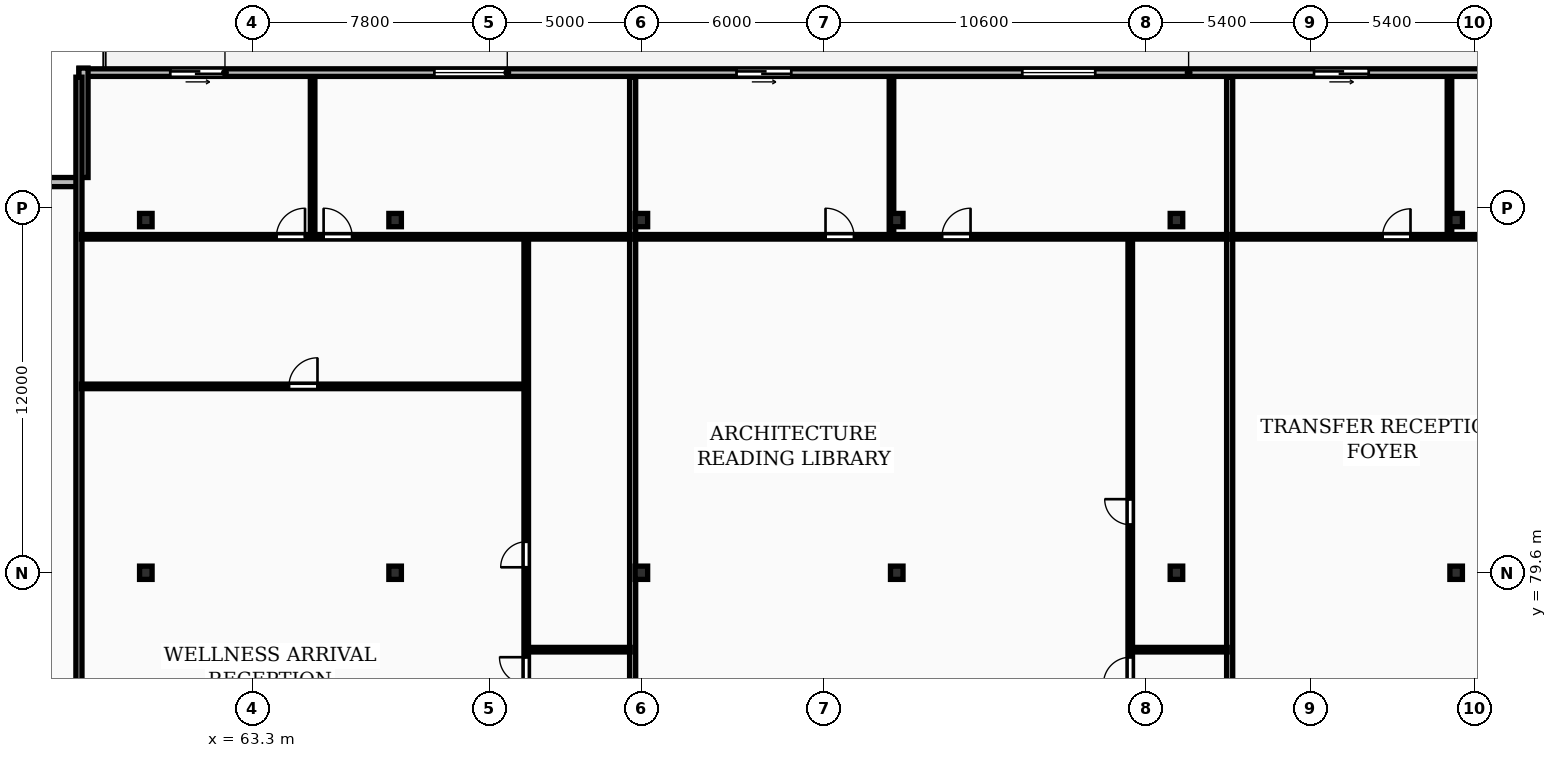
"""IFC4 building model, lengths in metres.
Left out: names, types, materials, properties, quantities, classifications, styles, units other than length and angle.
Written with IfcOpenShell. Run it as: python <this file> out.ifc"""

import sys

from ifc_helpers import new_model, si_unit, direction, frame, frame_2d, origin, origin_2d, place, context, subcontext, project, spatial, rectangle, i_section, extrude, element, fill, save


model = new_model("IFC4")
c1 = context("Model", 3, precision=1e-05, world=origin(), true_north=direction((0.0, 1.0)))
c2 = subcontext(c1, "Body", "Model", "MODEL_VIEW")
j1 = project(units=[si_unit("LENGTHUNIT", "METRE"), si_unit("PLANEANGLEUNIT", "RADIAN")], contexts=[c1])
p1 = place(None, origin())
s1 = spatial("IfcSite", under=j1, at=p1, CompositionType="ELEMENT")
p2 = place(p1, origin())
s2 = spatial("IfcBuilding", under=s1, at=p2, CompositionType="ELEMENT")
p3 = place(p2, frame((0.0, 0.0, 153.7)))
s3 = spatial("IfcBuildingStorey", under=s2, at=p3, CompositionType="ELEMENT", Elevation=153.7)
for number, where, z_axis, x_axis in (
    (1, (59.8, 79.6, 0.0), (0.0, 0.0, 1.0), (1.0, 0.0, 0.0)),
    (2, (59.8, 91.2, 0.0), (0.0, 0.0, 1.0), (1.0, 0.0, 0.0)),
    (3, (68.0, 79.6, 0.0), (0.0, 0.0, 1.0), (1.0, 0.0, 0.0)),
    (4, (68.0, 91.2, 0.0), (0.0, 0.0, 1.0), (1.0, 0.0, 0.0)),
    (5, (76.1, 79.6, 0.0), (0.0, 0.0, 1.0), (1.0, 0.0, 0.0)),
    (6, (76.1, 91.2, 0.0), (0.0, 0.0, 1.0), (1.0, 0.0, 0.0)),
    (7, (84.5, 79.6, 0.0), (0.0, 0.0, 1.0), (1.0, 0.0, 0.0)),
    (8, (84.5, 91.2, 0.0), (0.0, 0.0, 1.0), (1.0, 0.0, 0.0)),
    (9, (93.7, 79.6, 0.0), (0.0, 0.0, 1.0), (1.0, 0.0, 0.0)),
    (10, (93.7, 91.2, 0.0), (0.0, 0.0, 1.0), (1.0, 0.0, 0.0)),
    (11, (102.9, 79.6, 0.0), (0.0, 0.0, 1.0), (1.0, 0.0, 0.0)),
    (12, (102.9, 91.2, 0.0), (0.0, 0.0, 1.0), (1.0, 0.0, 0.0)),
):
    element("IfcColumn", number, at=place(p3, frame(where, z_axis=z_axis, x_axis=x_axis)), inside=s3, PredefinedType="COLUMN", context=c2, shape_type="SweptSolid", body=[
        extrude(i_section(OverallWidth=0.412, OverallDepth=0.437, WebThickness=0.036, FlangeThickness=0.052, FilletRadius=0.015, at=origin_2d()), origin(), (0.0, 0.0, 1.0), 3.6),
    ])
p4 = place(p3, frame((130.6, 96.05, 0.0), z_axis=(0.0, 0.0, 1.0), x_axis=(-1.0, 0.0, 0.0)))
e13 = element("IfcWall", 13, at=p4, inside=s3, PredefinedType="STANDARD", context=c2, shape_type="SweptSolid", body=[
    extrude(rectangle(XDim=73.0, YDim=0.25, at=frame_2d((36.5, 0.0))), origin(), (0.0, 0.0, 1.0), 3.32),
])
p5 = place(p4, frame((68.197, 0.0, 0.0)))
e14 = element("IfcOpeningElement", 14, at=p5, cuts=e13, PredefinedType="OPENING", context=c2, shape_type="SweptSolid", body=[
    extrude(rectangle(XDim=1.8, YDim=2.2, at=frame_2d((0.9, 1.1))), frame((0.0, 0.135, 0.0), z_axis=(0.0, -1.0, 0.0), x_axis=(1.0, 0.0, 0.0)), (0.0, 0.0, 1.0), 0.27),
])
p6 = place(p4, frame((58.911, 0.0, 0.85)))
e15 = element("IfcOpeningElement", 15, at=p6, cuts=e13, PredefinedType="OPENING", context=c2, shape_type="SweptSolid", body=[
    extrude(rectangle(XDim=2.4, YDim=1.9, at=frame_2d((1.2, 0.95))), frame((0.0, 0.135, 0.0), z_axis=(0.0, -1.0, 0.0), x_axis=(1.0, 0.0, 0.0)), (0.0, 0.0, 1.0), 0.27),
])
p7 = place(p4, frame((49.571, 0.0, 0.0)))
e16 = element("IfcOpeningElement", 16, at=p7, cuts=e13, PredefinedType="OPENING", context=c2, shape_type="SweptSolid", body=[
    extrude(rectangle(XDim=1.8, YDim=2.2, at=frame_2d((0.9, 1.1))), frame((0.0, 0.135, 0.0), z_axis=(0.0, -1.0, 0.0), x_axis=(1.0, 0.0, 0.0)), (0.0, 0.0, 1.0), 0.27),
])
p8 = place(p4, frame((39.572, 0.0, 0.85)))
e17 = element("IfcOpeningElement", 17, at=p8, cuts=e13, PredefinedType="OPENING", context=c2, shape_type="SweptSolid", body=[
    extrude(rectangle(XDim=2.4, YDim=1.9, at=frame_2d((1.2, 0.95))), frame((0.0, 0.135, 0.0), z_axis=(0.0, -1.0, 0.0), x_axis=(1.0, 0.0, 0.0)), (0.0, 0.0, 1.0), 0.27),
])
p9 = place(p4, frame((30.575, 0.0, 0.0)))
e18 = element("IfcOpeningElement", 18, at=p9, cuts=e13, PredefinedType="OPENING", context=c2, shape_type="SweptSolid", body=[
    extrude(rectangle(XDim=1.8, YDim=2.2, at=frame_2d((0.9, 1.1))), frame((0.0, 0.135, 0.0), z_axis=(0.0, -1.0, 0.0), x_axis=(1.0, 0.0, 0.0)), (0.0, 0.0, 1.0), 0.27),
])
p10 = place(p4, frame((21.745, 0.0, 0.85)))
e19 = element("IfcOpeningElement", 19, at=p10, cuts=e13, PredefinedType="OPENING", context=c2, shape_type="SweptSolid", body=[
    extrude(rectangle(XDim=2.4, YDim=1.9, at=frame_2d((1.2, 0.95))), frame((0.0, 0.135, 0.0), z_axis=(0.0, -1.0, 0.0), x_axis=(1.0, 0.0, 0.0)), (0.0, 0.0, 1.0), 0.27),
])
p11 = place(p4, frame((9.435, 0.0, 0.85)))
e20 = element("IfcOpeningElement", 20, at=p11, cuts=e13, PredefinedType="OPENING", context=c2, shape_type="SweptSolid", body=[
    extrude(rectangle(XDim=2.4, YDim=1.9, at=frame_2d((1.2, 0.95))), frame((0.0, 0.135, 0.0), z_axis=(0.0, -1.0, 0.0), x_axis=(1.0, 0.0, 0.0)), (0.0, 0.0, 1.0), 0.27),
])
p12 = place(p4, frame((5.695, 0.0, 0.85)))
e21 = element("IfcOpeningElement", 21, at=p12, cuts=e13, PredefinedType="OPENING", context=c2, shape_type="SweptSolid", body=[
    extrude(rectangle(XDim=1.8, YDim=1.8, at=frame_2d((0.9, 0.9))), frame((0.0, 0.135, 0.0), z_axis=(0.0, -1.0, 0.0), x_axis=(1.0, 0.0, 0.0)), (0.0, 0.0, 1.0), 0.27),
])
p13 = place(p4, frame((14.39, 0.0, 0.0)))
e22 = element("IfcOpeningElement", 22, at=p13, cuts=e13, PredefinedType="OPENING", context=c2, shape_type="SweptSolid", body=[
    extrude(rectangle(XDim=1.8, YDim=2.2, at=frame_2d((0.9, 1.1))), frame((0.0, 0.135, 0.0), z_axis=(0.0, -1.0, 0.0), x_axis=(1.0, 0.0, 0.0)), (0.0, 0.0, 1.0), 0.27),
])
p14 = place(p4, frame((1.245, 0.0, 0.85)))
e23 = element("IfcOpeningElement", 23, at=p14, cuts=e13, PredefinedType="OPENING", context=c2, shape_type="SweptSolid", body=[
    extrude(rectangle(XDim=2.4, YDim=1.9, at=frame_2d((1.2, 0.95))), frame((0.0, 0.135, 0.0), z_axis=(0.0, -1.0, 0.0), x_axis=(1.0, 0.0, 0.0)), (0.0, 0.0, 1.0), 0.27),
])
p15 = place(p3, frame((57.75, 96.2, 0.0), z_axis=(0.0, 0.0, 1.0), x_axis=(0.0, -1.0, 0.0)))
e24 = element("IfcWall", 24, at=p15, inside=s3, PredefinedType="STANDARD", context=c2, shape_type="SweptSolid", body=[
    extrude(rectangle(XDim=3.6, YDim=0.3, at=frame_2d((1.8, 0.0))), origin(), (0.0, 0.0, 1.0), 3.32),
])
p16 = place(p3, frame((57.6, 92.45, 0.0), z_axis=(0.0, 0.0, 1.0), x_axis=(-1.0, 0.0, 0.0)))
e25 = element("IfcWall", 25, at=p16, inside=s3, PredefinedType="STANDARD", context=c2, shape_type="SweptSolid", body=[
    extrude(rectangle(XDim=3.6, YDim=0.3, at=frame_2d((1.8, 0.0))), origin(), (0.0, 0.0, 1.0), 3.32),
])
p17 = place(p3, frame((57.6, 69.83, 0.0), z_axis=(0.0, 0.0, 1.0), x_axis=(0.0, 1.0, 0.0)))
e26 = element("IfcWall", 26, at=p17, inside=s3, PredefinedType="PARTITIONING", context=c2, shape_type="SweptSolid", body=[
    extrude(rectangle(XDim=26.07, YDim=0.2, at=frame_2d((13.035, 0.0))), origin(), (0.0, 0.0, 1.0), 3.32),
])
p18 = place(p3, frame((75.812, 69.83, 0.0), z_axis=(0.0, 0.0, 1.0), x_axis=(0.0, 1.0, 0.0)))
e27 = element("IfcWall", 27, at=p18, inside=s3, PredefinedType="PARTITIONING", context=c2, shape_type="SweptSolid", body=[
    extrude(rectangle(XDim=26.07, YDim=0.2, at=frame_2d((13.035, 0.0))), origin(), (0.0, 0.0, 1.0), 2.627),
])
p19 = place(p3, frame((57.68, 85.73, 0.0), z_axis=(0.0, 0.0, 1.0), x_axis=(1.0, 0.0, 0.0)))
e28 = element("IfcWall", 28, at=p19, inside=s3, PredefinedType="PARTITIONING", context=c2, shape_type="SweptSolid", body=[
    extrude(rectangle(XDim=14.593, YDim=0.15, at=frame_2d((7.296, 0.0))), origin(), (0.0, 0.0, 1.0), 3.32),
])
p20 = place(p19, frame((6.826, 0.0, 0.0)))
e29 = element("IfcOpeningElement", 29, at=p20, cuts=e28, PredefinedType="OPENING", context=c2, shape_type="SweptSolid", body=[
    extrude(rectangle(XDim=0.94, YDim=2.1, at=frame_2d((0.47, 1.05))), frame((0.0, 0.085, 0.0), z_axis=(0.0, -1.0, 0.0), x_axis=(1.0, 0.0, 0.0)), (0.0, 0.0, 1.0), 0.17),
])
p21 = place(p3, frame((72.373, 77.07, 0.0), z_axis=(0.0, 0.0, 1.0), x_axis=(1.0, 0.0, 0.0)))
e30 = element("IfcWall", 30, at=p21, inside=s3, PredefinedType="PARTITIONING", context=c2, shape_type="SweptSolid", body=[
    extrude(rectangle(XDim=3.36, YDim=0.15, at=frame_2d((1.68, 0.0))), origin(), (0.0, 0.0, 1.0), 3.32),
])
p22 = place(p3, frame((72.312, 69.81, 0.0), z_axis=(0.0, 0.0, 1.0), x_axis=(0.0, 1.0, 0.0)))
e31 = element("IfcWall", 31, at=p22, inside=s3, PredefinedType="PARTITIONING", context=c2, shape_type="SweptSolid", body=[
    extrude(rectangle(XDim=20.78, YDim=0.15, at=frame_2d((10.39, 0.0))), origin(), (0.0, 0.0, 1.0), 3.32),
])
p23 = place(p22, frame((2.406, 0.0, 0.0)))
e32 = element("IfcOpeningElement", 32, at=p23, cuts=e31, PredefinedType="OPENING", context=c2, shape_type="SweptSolid", body=[
    extrude(rectangle(XDim=0.96, YDim=2.1, at=frame_2d((0.48, 1.05))), frame((0.0, 0.085, 0.0), z_axis=(0.0, -1.0, 0.0), x_axis=(1.0, 0.0, 0.0)), (0.0, 0.0, 1.0), 0.17),
])
p24 = place(p22, frame((6.133, 0.0, 0.0)))
e33 = element("IfcOpeningElement", 33, at=p24, cuts=e31, PredefinedType="OPENING", context=c2, shape_type="SweptSolid", body=[
    extrude(rectangle(XDim=0.88, YDim=2.06, at=frame_2d((0.44, 1.03))), frame((0.0, 0.085, 0.0), z_axis=(0.0, -1.0, 0.0), x_axis=(1.0, 0.0, 0.0)), (0.0, 0.0, 1.0), 0.17),
])
p25 = place(p22, frame((9.97, 0.0, 0.0)))
e34 = element("IfcOpeningElement", 34, at=p25, cuts=e31, PredefinedType="OPENING", context=c2, shape_type="SweptSolid", body=[
    extrude(rectangle(XDim=0.84, YDim=2.04, at=frame_2d((0.42, 1.02))), frame((0.0, 0.085, 0.0), z_axis=(0.0, -1.0, 0.0), x_axis=(1.0, 0.0, 0.0)), (0.0, 0.0, 1.0), 0.17),
])
p26 = place(p3, frame((65.286, 90.73, 0.0), z_axis=(0.0, 0.0, 1.0), x_axis=(0.0, 1.0, 0.0)))
e35 = element("IfcWall", 35, at=p26, inside=s3, PredefinedType="PARTITIONING", context=c2, shape_type="SweptSolid", body=[
    extrude(rectangle(XDim=5.17, YDim=0.15, at=frame_2d((2.585, 0.0))), origin(), (0.0, 0.0, 1.0), 3.32),
])
p27 = place(p3, frame((57.68, 90.65, 0.0), z_axis=(0.0, 0.0, 1.0), x_axis=(1.0, 0.0, 0.0)))
e36 = element("IfcWall", 36, at=p27, inside=s3, PredefinedType="PARTITIONING", context=c2, shape_type="SweptSolid", body=[
    extrude(rectangle(XDim=18.052, YDim=0.15, at=frame_2d((9.026, 0.0))), origin(), (0.0, 0.0, 1.0), 3.32),
])
p28 = place(p27, frame((6.416, 0.0, 0.0)))
e37 = element("IfcOpeningElement", 37, at=p28, cuts=e36, PredefinedType="OPENING", context=c2, shape_type="SweptSolid", body=[
    extrude(rectangle(XDim=0.94, YDim=2.1, at=frame_2d((0.47, 1.05))), frame((0.0, 0.085, 0.0), z_axis=(0.0, -1.0, 0.0), x_axis=(1.0, 0.0, 0.0)), (0.0, 0.0, 1.0), 0.17),
])
p29 = place(p27, frame((7.968, 0.0, 0.0)))
e38 = element("IfcOpeningElement", 38, at=p29, cuts=e36, PredefinedType="OPENING", context=c2, shape_type="SweptSolid", body=[
    extrude(rectangle(XDim=0.94, YDim=2.1, at=frame_2d((0.47, 1.05))), frame((0.0, 0.085, 0.0), z_axis=(0.0, -1.0, 0.0), x_axis=(1.0, 0.0, 0.0)), (0.0, 0.0, 1.0), 0.17),
])
p30 = place(p3, frame((95.45, 69.83, 0.0), z_axis=(0.0, 0.0, 1.0), x_axis=(0.0, 1.0, 0.0)))
e39 = element("IfcWall", 39, at=p30, inside=s3, PredefinedType="PARTITIONING", context=c2, shape_type="SweptSolid", body=[
    extrude(rectangle(XDim=26.07, YDim=0.2, at=frame_2d((13.035, 0.0))), origin(), (0.0, 0.0, 1.0), 3.32),
])
p31 = place(p3, frame((92.24, 77.07, 0.0), z_axis=(0.0, 0.0, 1.0), x_axis=(1.0, 0.0, 0.0)))
e40 = element("IfcWall", 40, at=p31, inside=s3, PredefinedType="PARTITIONING", context=c2, shape_type="SweptSolid", body=[
    extrude(rectangle(XDim=3.13, YDim=0.15, at=frame_2d((1.565, 0.0))), origin(), (0.0, 0.0, 1.0), 3.32),
])
p32 = place(p3, frame((92.18, 69.81, 0.0), z_axis=(0.0, 0.0, 1.0), x_axis=(0.0, 1.0, 0.0)))
e41 = element("IfcWall", 41, at=p32, inside=s3, PredefinedType="PARTITIONING", context=c2, shape_type="SweptSolid", body=[
    extrude(rectangle(XDim=20.78, YDim=0.15, at=frame_2d((10.39, 0.0))), origin(), (0.0, 0.0, 1.0), 3.32),
])
p33 = place(p32, frame((2.406, 0.0, 0.0)))
e42 = element("IfcOpeningElement", 42, at=p33, cuts=e41, PredefinedType="OPENING", context=c2, shape_type="SweptSolid", body=[
    extrude(rectangle(XDim=0.96, YDim=2.1, at=frame_2d((0.48, 1.05))), frame((0.0, 0.085, 0.0), z_axis=(0.0, -1.0, 0.0), x_axis=(1.0, 0.0, 0.0)), (0.0, 0.0, 1.0), 0.17),
])
p34 = place(p32, frame((6.133, 0.0, 0.0)))
e43 = element("IfcOpeningElement", 43, at=p34, cuts=e41, PredefinedType="OPENING", context=c2, shape_type="SweptSolid", body=[
    extrude(rectangle(XDim=0.88, YDim=2.06, at=frame_2d((0.44, 1.03))), frame((0.0, 0.085, 0.0), z_axis=(0.0, -1.0, 0.0), x_axis=(1.0, 0.0, 0.0)), (0.0, 0.0, 1.0), 0.17),
])
p35 = place(p32, frame((11.37, 0.0, 0.0)))
e44 = element("IfcOpeningElement", 44, at=p35, cuts=e41, PredefinedType="OPENING", context=c2, shape_type="SweptSolid", body=[
    extrude(rectangle(XDim=0.84, YDim=2.04, at=frame_2d((0.42, 1.02))), frame((0.0, 0.085, 0.0), z_axis=(0.0, -1.0, 0.0), x_axis=(1.0, 0.0, 0.0)), (0.0, 0.0, 1.0), 0.17),
])
p36 = place(p3, frame((84.326, 90.73, 0.0), z_axis=(0.0, 0.0, 1.0), x_axis=(0.0, 1.0, 0.0)))
e45 = element("IfcWall", 45, at=p36, inside=s3, PredefinedType="PARTITIONING", context=c2, shape_type="SweptSolid", body=[
    extrude(rectangle(XDim=5.17, YDim=0.15, at=frame_2d((2.585, 0.0))), origin(), (0.0, 0.0, 1.0), 2.627),
])
p37 = place(p3, frame((75.893, 90.65, 0.0), z_axis=(0.0, 0.0, 1.0), x_axis=(1.0, 0.0, 0.0)))
e46 = element("IfcWall", 46, at=p37, inside=s3, PredefinedType="PARTITIONING", context=c2, shape_type="SweptSolid", body=[
    extrude(rectangle(XDim=19.478, YDim=0.15, at=frame_2d((9.739, 0.0))), origin(), (0.0, 0.0, 1.0), 3.32),
])
p38 = place(p37, frame((6.265, 0.0, 0.0)))
e47 = element("IfcOpeningElement", 47, at=p38, cuts=e46, PredefinedType="OPENING", context=c2, shape_type="SweptSolid", body=[
    extrude(rectangle(XDim=0.94, YDim=2.1, at=frame_2d((0.47, 1.05))), frame((0.0, 0.085, 0.0), z_axis=(0.0, -1.0, 0.0), x_axis=(1.0, 0.0, 0.0)), (0.0, 0.0, 1.0), 0.17),
])
p39 = place(p37, frame((10.095, 0.0, 0.0)))
e48 = element("IfcOpeningElement", 48, at=p39, cuts=e46, PredefinedType="OPENING", context=c2, shape_type="SweptSolid", body=[
    extrude(rectangle(XDim=0.94, YDim=2.1, at=frame_2d((0.47, 1.05))), frame((0.0, 0.085, 0.0), z_axis=(0.0, -1.0, 0.0), x_axis=(1.0, 0.0, 0.0)), (0.0, 0.0, 1.0), 0.17),
])
p40 = place(p3, frame((102.68, 90.73, 0.0), z_axis=(0.0, 0.0, 1.0), x_axis=(0.0, 1.0, 0.0)))
e49 = element("IfcWall", 49, at=p40, inside=s3, PredefinedType="PARTITIONING", context=c2, shape_type="SweptSolid", body=[
    extrude(rectangle(XDim=5.17, YDim=0.15, at=frame_2d((2.585, 0.0))), origin(), (0.0, 0.0, 1.0), 2.627),
])
p41 = place(p3, frame((95.53, 90.65, 0.0), z_axis=(0.0, 0.0, 1.0), x_axis=(1.0, 0.0, 0.0)))
e50 = element("IfcWall", 50, at=p41, inside=s3, PredefinedType="PARTITIONING", context=c2, shape_type="SweptSolid", body=[
    extrude(rectangle(XDim=17.14, YDim=0.15, at=frame_2d((8.57, 0.0))), origin(), (0.0, 0.0, 1.0), 3.32),
])
p42 = place(p41, frame((4.948, 0.0, 0.0)))
e51 = element("IfcOpeningElement", 51, at=p42, cuts=e50, PredefinedType="OPENING", context=c2, shape_type="SweptSolid", body=[
    extrude(rectangle(XDim=0.92, YDim=2.08, at=frame_2d((0.46, 1.04))), frame((0.0, 0.085, 0.0), z_axis=(0.0, -1.0, 0.0), x_axis=(1.0, 0.0, 0.0)), (0.0, 0.0, 1.0), 0.17),
])
p43 = place(p41, frame((8.842, 0.0, 0.0)))
e52 = element("IfcOpeningElement", 52, at=p43, cuts=e50, PredefinedType="OPENING", context=c2, shape_type="SweptSolid", body=[
    extrude(rectangle(XDim=0.92, YDim=2.08, at=frame_2d((0.46, 1.04))), frame((0.0, 0.085, 0.0), z_axis=(0.0, -1.0, 0.0), x_axis=(1.0, 0.0, 0.0)), (0.0, 0.0, 1.0), 0.17),
])
p44 = place(p5, origin())
e53 = element("IfcDoor", 53, at=p44, inside=s3, OperationType="SLIDING_TO_LEFT", PredefinedType="DOOR", context=c2, shape_type="SweptSolid", body=[
    extrude(rectangle(XDim=1.8, YDim=2.2, at=frame_2d((0.9, 1.1))), frame((0.0, 0.025, 0.0), z_axis=(0.0, -1.0, 0.0), x_axis=(1.0, 0.0, 0.0)), (0.0, 0.0, 1.0), 0.05),
])
fill(e14, e53)
p45 = place(p6, origin())
e54 = element("IfcWindow", 54, at=p45, inside=s3, PartitioningType="DOUBLE_PANEL_VERTICAL", PredefinedType="WINDOW", context=c2, shape_type="SweptSolid", body=[
    extrude(rectangle(XDim=2.4, YDim=1.9, at=frame_2d((1.2, 0.95))), frame((0.0, 0.03, 0.0), z_axis=(0.0, -1.0, 0.0), x_axis=(1.0, 0.0, 0.0)), (0.0, 0.0, 1.0), 0.06),
])
fill(e15, e54)
p46 = place(p7, origin())
e55 = element("IfcDoor", 55, at=p46, inside=s3, OperationType="SLIDING_TO_LEFT", PredefinedType="DOOR", context=c2, shape_type="SweptSolid", body=[
    extrude(rectangle(XDim=1.8, YDim=2.2, at=frame_2d((0.9, 1.1))), frame((0.0, 0.025, 0.0), z_axis=(0.0, -1.0, 0.0), x_axis=(1.0, 0.0, 0.0)), (0.0, 0.0, 1.0), 0.05),
])
fill(e16, e55)
p47 = place(p8, origin())
e56 = element("IfcWindow", 56, at=p47, inside=s3, PartitioningType="DOUBLE_PANEL_VERTICAL", PredefinedType="WINDOW", context=c2, shape_type="SweptSolid", body=[
    extrude(rectangle(XDim=2.4, YDim=1.9, at=frame_2d((1.2, 0.95))), frame((0.0, 0.03, 0.0), z_axis=(0.0, -1.0, 0.0), x_axis=(1.0, 0.0, 0.0)), (0.0, 0.0, 1.0), 0.06),
])
fill(e17, e56)
p48 = place(p9, origin())
e57 = element("IfcDoor", 57, at=p48, inside=s3, OperationType="SLIDING_TO_LEFT", PredefinedType="DOOR", context=c2, shape_type="SweptSolid", body=[
    extrude(rectangle(XDim=1.8, YDim=2.2, at=frame_2d((0.9, 1.1))), frame((0.0, 0.025, 0.0), z_axis=(0.0, -1.0, 0.0), x_axis=(1.0, 0.0, 0.0)), (0.0, 0.0, 1.0), 0.05),
])
fill(e18, e57)
p49 = place(p20, origin())
e58 = element("IfcDoor", 58, at=p49, inside=s3, OperationType="SINGLE_SWING_RIGHT", PredefinedType="DOOR", context=c2, shape_type="SweptSolid", body=[
    extrude(rectangle(XDim=0.94, YDim=2.1, at=frame_2d((0.47, 1.05))), frame((0.0, 0.025, 0.0), z_axis=(0.0, -1.0, 0.0), x_axis=(1.0, 0.0, 0.0)), (0.0, 0.0, 1.0), 0.05),
])
fill(e29, e58)
p50 = place(p24, origin())
e59 = element("IfcDoor", 59, at=p50, inside=s3, OperationType="SINGLE_SWING_RIGHT", PredefinedType="DOOR", context=c2, shape_type="SweptSolid", body=[
    extrude(rectangle(XDim=0.88, YDim=2.06, at=frame_2d((0.44, 1.03))), frame((0.0, 0.025, 0.0), z_axis=(0.0, -1.0, 0.0), x_axis=(1.0, 0.0, 0.0)), (0.0, 0.0, 1.0), 0.05),
])
fill(e33, e59)
p51 = place(p25, origin())
e60 = element("IfcDoor", 60, at=p51, inside=s3, OperationType="SINGLE_SWING_LEFT", PredefinedType="DOOR", context=c2, shape_type="SweptSolid", body=[
    extrude(rectangle(XDim=0.84, YDim=2.04, at=frame_2d((0.42, 1.02))), frame((0.0, 0.025, 0.0), z_axis=(0.0, -1.0, 0.0), x_axis=(1.0, 0.0, 0.0)), (0.0, 0.0, 1.0), 0.05),
])
fill(e34, e60)
p52 = place(p28, origin())
e61 = element("IfcDoor", 61, at=p52, inside=s3, OperationType="SINGLE_SWING_RIGHT", PredefinedType="DOOR", context=c2, shape_type="SweptSolid", body=[
    extrude(rectangle(XDim=0.94, YDim=2.1, at=frame_2d((0.47, 1.05))), frame((0.0, 0.025, 0.0), z_axis=(0.0, -1.0, 0.0), x_axis=(1.0, 0.0, 0.0)), (0.0, 0.0, 1.0), 0.05),
])
fill(e37, e61)
p53 = place(p29, origin())
e62 = element("IfcDoor", 62, at=p53, inside=s3, OperationType="SINGLE_SWING_LEFT", PredefinedType="DOOR", context=c2, shape_type="SweptSolid", body=[
    extrude(rectangle(XDim=0.94, YDim=2.1, at=frame_2d((0.47, 1.05))), frame((0.0, 0.025, 0.0), z_axis=(0.0, -1.0, 0.0), x_axis=(1.0, 0.0, 0.0)), (0.0, 0.0, 1.0), 0.05),
])
fill(e38, e62)
p54 = place(p34, origin())
e63 = element("IfcDoor", 63, at=p54, inside=s3, OperationType="SINGLE_SWING_LEFT", PredefinedType="DOOR", context=c2, shape_type="SweptSolid", body=[
    extrude(rectangle(XDim=0.88, YDim=2.06, at=frame_2d((0.44, 1.03))), frame((0.0, 0.025, 0.0), z_axis=(0.0, -1.0, 0.0), x_axis=(1.0, 0.0, 0.0)), (0.0, 0.0, 1.0), 0.05),
])
fill(e43, e63)
p55 = place(p35, origin())
e64 = element("IfcDoor", 64, at=p55, inside=s3, OperationType="SINGLE_SWING_RIGHT", PredefinedType="DOOR", context=c2, shape_type="SweptSolid", body=[
    extrude(rectangle(XDim=0.84, YDim=2.04, at=frame_2d((0.42, 1.02))), frame((0.0, 0.025, 0.0), z_axis=(0.0, -1.0, 0.0), x_axis=(1.0, 0.0, 0.0)), (0.0, 0.0, 1.0), 0.05),
])
fill(e44, e64)
p56 = place(p38, origin())
e65 = element("IfcDoor", 65, at=p56, inside=s3, OperationType="SINGLE_SWING_LEFT", PredefinedType="DOOR", context=c2, shape_type="SweptSolid", body=[
    extrude(rectangle(XDim=0.94, YDim=2.1, at=frame_2d((0.47, 1.05))), frame((0.0, 0.025, 0.0), z_axis=(0.0, -1.0, 0.0), x_axis=(1.0, 0.0, 0.0)), (0.0, 0.0, 1.0), 0.05),
])
fill(e47, e65)
p57 = place(p39, origin())
e66 = element("IfcDoor", 66, at=p57, inside=s3, OperationType="SINGLE_SWING_RIGHT", PredefinedType="DOOR", context=c2, shape_type="SweptSolid", body=[
    extrude(rectangle(XDim=0.94, YDim=2.1, at=frame_2d((0.47, 1.05))), frame((0.0, 0.025, 0.0), z_axis=(0.0, -1.0, 0.0), x_axis=(1.0, 0.0, 0.0)), (0.0, 0.0, 1.0), 0.05),
])
fill(e48, e66)
p58 = place(p42, origin())
e67 = element("IfcDoor", 67, at=p58, inside=s3, OperationType="SINGLE_SWING_RIGHT", PredefinedType="DOOR", context=c2, shape_type="SweptSolid", body=[
    extrude(rectangle(XDim=0.92, YDim=2.08, at=frame_2d((0.46, 1.04))), frame((0.0, 0.025, 0.0), z_axis=(0.0, -1.0, 0.0), x_axis=(1.0, 0.0, 0.0)), (0.0, 0.0, 1.0), 0.05),
])
fill(e51, e67)
save(model, sys.argv[1])
